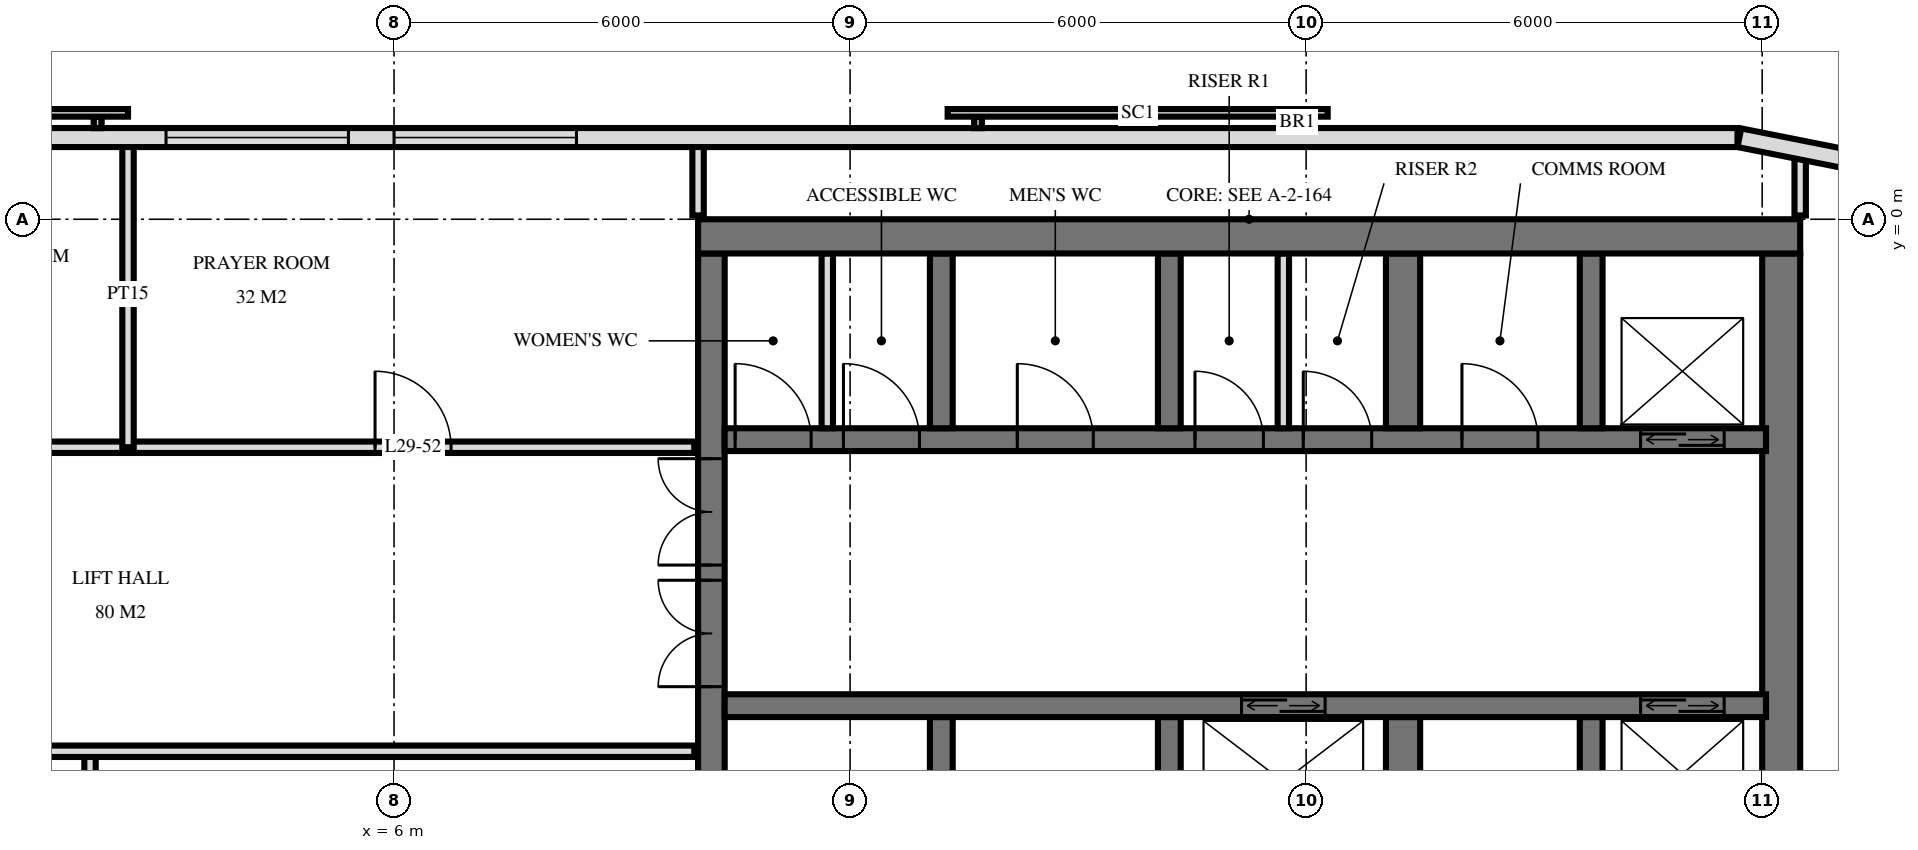
"""IFC4 building model, lengths in metres.
Left out: names, types, materials, properties, quantities, classifications, styles, units other than length and angle.
Written with IfcOpenShell. Run it as: python <this file> out.ifc"""

import sys

from ifc_helpers import new_model, si_unit, direction, frame, frame_2d, origin, place, context, subcontext, project, spatial, rectangle, extrude, element, fill, save


model = new_model("IFC4")
c1 = context("Model", 3, precision=1e-05, world=origin(), true_north=direction((0.0, 1.0)))
c2 = subcontext(c1, "Body", "Model", "MODEL_VIEW")
j1 = project(units=[si_unit("LENGTHUNIT", "METRE"), si_unit("PLANEANGLEUNIT", "RADIAN")], contexts=[c1])
p1 = place(None, origin())
s1 = spatial("IfcSite", under=j1, at=p1, CompositionType="ELEMENT")
p2 = place(p1, origin())
s2 = spatial("IfcBuilding", under=s1, at=p2, CompositionType="ELEMENT")
p3 = place(p2, frame((0.0, 0.0, 116.4)))
s3 = spatial("IfcBuildingStorey", under=s2, at=p3, CompositionType="ELEMENT", Elevation=116.4)
p4 = place(p3, frame((10.0, -0.225, 0.0), z_axis=(0.0, 0.0, 1.0), x_axis=(1.0, 0.0, 0.0)))
e1 = element("IfcWall", 1, at=p4, inside=s3, PredefinedType="SHEAR", context=c2, shape_type="SweptSolid", body=[
    extrude(rectangle(XDim=14.5, YDim=0.45, at=frame_2d((7.25, 0.0))), origin(), (0.0, 0.0, 1.0), 3.6),
])
p5 = place(p3, frame((10.175, -14.55, 0.0), z_axis=(0.0, 0.0, 1.0), x_axis=(0.0, 1.0, 0.0)))
e2 = element("IfcWall", 2, at=p5, inside=s3, PredefinedType="SHEAR", context=c2, shape_type="SweptSolid", body=[
    extrude(rectangle(XDim=14.1, YDim=0.35, at=frame_2d((7.05, 0.0))), origin(), (0.0, 0.0, 1.0), 3.6),
])
p6 = place(p5, frame((8.4, 0.0, 0.0)))
e3 = element("IfcOpeningElement", 3, at=p6, cuts=e2, PredefinedType="OPENING", context=c2, shape_type="SweptSolid", body=[
    extrude(rectangle(XDim=1.4, YDim=2.4, at=frame_2d((0.7, 1.2))), frame((0.0, 0.185, 0.0), z_axis=(0.0, -1.0, 0.0), x_axis=(1.0, 0.0, 0.0)), (0.0, 0.0, 1.0), 0.37),
])
p7 = place(p5, frame((10.0, 0.0, 0.0)))
e4 = element("IfcOpeningElement", 4, at=p7, cuts=e2, PredefinedType="OPENING", context=c2, shape_type="SweptSolid", body=[
    extrude(rectangle(XDim=1.4, YDim=2.4, at=frame_2d((0.7, 1.2))), frame((0.0, 0.185, 0.0), z_axis=(0.0, -1.0, 0.0), x_axis=(1.0, 0.0, 0.0)), (0.0, 0.0, 1.0), 0.37),
])
p8 = place(p5, frame((4.0, 0.0, 0.0)))
e5 = element("IfcOpeningElement", 5, at=p8, cuts=e2, PredefinedType="OPENING", context=c2, shape_type="SweptSolid", body=[
    extrude(rectangle(XDim=1.2, YDim=2.1, at=frame_2d((0.6, 1.05))), frame((0.0, 0.185, 0.0), z_axis=(0.0, -1.0, 0.0), x_axis=(1.0, 0.0, 0.0)), (0.0, 0.0, 1.0), 0.37),
])
p9 = place(p3, frame((24.25, -14.55, 0.0), z_axis=(0.0, 0.0, 1.0), x_axis=(0.0, 1.0, 0.0)))
e6 = element("IfcWall", 6, at=p9, inside=s3, PredefinedType="SHEAR", context=c2, shape_type="SweptSolid", body=[
    extrude(rectangle(XDim=14.1, YDim=0.5, at=frame_2d((7.05, 0.0))), origin(), (0.0, 0.0, 1.0), 3.6),
])
p10 = place(p3, frame((10.35, -2.9, 0.0), z_axis=(0.0, 0.0, 1.0), x_axis=(1.0, 0.0, 0.0)))
e7 = element("IfcWall", 7, at=p10, inside=s3, PredefinedType="SHEAR", context=c2, shape_type="SweptSolid", body=[
    extrude(rectangle(XDim=13.7, YDim=0.3, at=frame_2d((6.85, 0.0))), origin(), (0.0, 0.0, 1.0), 3.6),
])
p11 = place(p10, frame((12.05, 0.0, 0.0)))
e8 = element("IfcOpeningElement", 8, at=p11, cuts=e7, PredefinedType="OPENING", context=c2, shape_type="SweptSolid", body=[
    extrude(rectangle(XDim=1.1, YDim=2.1, at=frame_2d((0.55, 1.05))), frame((0.0, 0.16, 0.0), z_axis=(0.0, -1.0, 0.0), x_axis=(1.0, 0.0, 0.0)), (0.0, 0.0, 1.0), 0.32),
])
p12 = place(p10, frame((6.188, 0.0, 0.0)))
e9 = element("IfcOpeningElement", 9, at=p12, cuts=e7, PredefinedType="OPENING", context=c2, shape_type="SweptSolid", body=[
    extrude(rectangle(XDim=0.9, YDim=2.1, at=frame_2d((0.45, 1.05))), frame((0.0, 0.16, 0.0), z_axis=(0.0, -1.0, 0.0), x_axis=(1.0, 0.0, 0.0)), (0.0, 0.0, 1.0), 0.32),
])
p13 = place(p10, frame((7.613, 0.0, 0.0)))
e10 = element("IfcOpeningElement", 10, at=p13, cuts=e7, PredefinedType="OPENING", context=c2, shape_type="SweptSolid", body=[
    extrude(rectangle(XDim=0.9, YDim=2.1, at=frame_2d((0.45, 1.05))), frame((0.0, 0.16, 0.0), z_axis=(0.0, -1.0, 0.0), x_axis=(1.0, 0.0, 0.0)), (0.0, 0.0, 1.0), 0.32),
])
p14 = place(p10, frame((0.137, 0.0, 0.0)))
e11 = element("IfcOpeningElement", 11, at=p14, cuts=e7, PredefinedType="OPENING", context=c2, shape_type="SweptSolid", body=[
    extrude(rectangle(XDim=1.0, YDim=2.1, at=frame_2d((0.5, 1.05))), frame((0.0, 0.16, 0.0), z_axis=(0.0, -1.0, 0.0), x_axis=(1.0, 0.0, 0.0)), (0.0, 0.0, 1.0), 0.32),
])
p15 = place(p10, frame((1.562, 0.0, 0.0)))
e12 = element("IfcOpeningElement", 12, at=p15, cuts=e7, PredefinedType="OPENING", context=c2, shape_type="SweptSolid", body=[
    extrude(rectangle(XDim=1.0, YDim=2.1, at=frame_2d((0.5, 1.05))), frame((0.0, 0.16, 0.0), z_axis=(0.0, -1.0, 0.0), x_axis=(1.0, 0.0, 0.0)), (0.0, 0.0, 1.0), 0.32),
])
p16 = place(p10, frame((3.85, 0.0, 0.0)))
e13 = element("IfcOpeningElement", 13, at=p16, cuts=e7, PredefinedType="OPENING", context=c2, shape_type="SweptSolid", body=[
    extrude(rectangle(XDim=1.0, YDim=2.1, at=frame_2d((0.5, 1.05))), frame((0.0, 0.16, 0.0), z_axis=(0.0, -1.0, 0.0), x_axis=(1.0, 0.0, 0.0)), (0.0, 0.0, 1.0), 0.32),
])
p17 = place(p10, frame((9.7, 0.0, 0.0)))
e14 = element("IfcOpeningElement", 14, at=p17, cuts=e7, PredefinedType="OPENING", context=c2, shape_type="SweptSolid", body=[
    extrude(rectangle(XDim=1.0, YDim=2.1, at=frame_2d((0.5, 1.05))), frame((0.0, 0.16, 0.0), z_axis=(0.0, -1.0, 0.0), x_axis=(1.0, 0.0, 0.0)), (0.0, 0.0, 1.0), 0.32),
])
p18 = place(p3, frame((10.35, -6.4, 0.0), z_axis=(0.0, 0.0, 1.0), x_axis=(1.0, 0.0, 0.0)))
e15 = element("IfcWall", 15, at=p18, inside=s3, PredefinedType="SHEAR", context=c2, shape_type="SweptSolid", body=[
    extrude(rectangle(XDim=13.7, YDim=0.3, at=frame_2d((6.85, 0.0))), origin(), (0.0, 0.0, 1.0), 3.6),
])
p19 = place(p18, frame((12.05, 0.0, 0.0)))
e16 = element("IfcOpeningElement", 16, at=p19, cuts=e15, PredefinedType="OPENING", context=c2, shape_type="SweptSolid", body=[
    extrude(rectangle(XDim=1.1, YDim=2.1, at=frame_2d((0.55, 1.05))), frame((0.0, 0.16, 0.0), z_axis=(0.0, -1.0, 0.0), x_axis=(1.0, 0.0, 0.0)), (0.0, 0.0, 1.0), 0.32),
])
p20 = place(p18, frame((6.8, 0.0, 0.0)))
e17 = element("IfcOpeningElement", 17, at=p20, cuts=e15, PredefinedType="OPENING", context=c2, shape_type="SweptSolid", body=[
    extrude(rectangle(XDim=1.1, YDim=2.1, at=frame_2d((0.55, 1.05))), frame((0.0, 0.16, 0.0), z_axis=(0.0, -1.0, 0.0), x_axis=(1.0, 0.0, 0.0)), (0.0, 0.0, 1.0), 0.32),
])
for number, where, z_axis, x_axis in (
    (18, (13.2, -2.75, 0.0), (0.0, 0.0, 1.0), (0.0, 1.0, 0.0)),
    (19, (13.2, -8.85, 0.0), (0.0, 0.0, 1.0), (0.0, 1.0, 0.0)),
    (20, (16.2, -2.75, 0.0), (0.0, 0.0, 1.0), (0.0, 1.0, 0.0)),
    (21, (16.2, -8.85, 0.0), (0.0, 0.0, 1.0), (0.0, 1.0, 0.0)),
):
    element("IfcWall", number, at=place(p3, frame(where, z_axis=z_axis, x_axis=x_axis)), inside=s3, PredefinedType="SHEAR", context=c2, shape_type="SweptSolid", body=[
        extrude(rectangle(XDim=2.3, YDim=0.3, at=frame_2d((1.15, 0.0))), origin(), (0.0, 0.0, 1.0), 3.6),
    ])
for number, where, z_axis, x_axis in (
    (22, (19.275, -2.75, 0.0), (0.0, 0.0, 1.0), (0.0, 1.0, 0.0)),
    (23, (19.275, -8.85, 0.0), (0.0, 0.0, 1.0), (0.0, 1.0, 0.0)),
):
    element("IfcWall", number, at=place(p3, frame(where, z_axis=z_axis, x_axis=x_axis)), inside=s3, PredefinedType="SHEAR", context=c2, shape_type="SweptSolid", body=[
        extrude(rectangle(XDim=2.3, YDim=0.45, at=frame_2d((1.15, 0.0))), origin(), (0.0, 0.0, 1.0), 3.6),
    ])
for number, where, z_axis, x_axis in (
    (24, (21.75, -2.75, 0.0), (0.0, 0.0, 1.0), (0.0, 1.0, 0.0)),
    (25, (21.75, -8.85, 0.0), (0.0, 0.0, 1.0), (0.0, 1.0, 0.0)),
):
    element("IfcWall", number, at=place(p3, frame(where, z_axis=z_axis, x_axis=x_axis)), inside=s3, PredefinedType="SHEAR", context=c2, shape_type="SweptSolid", body=[
        extrude(rectangle(XDim=2.3, YDim=0.3, at=frame_2d((1.15, 0.0))), origin(), (0.0, 0.0, 1.0), 3.6),
    ])
p21 = place(p3, frame((25.349, 0.745, 0.0), z_axis=(0.0, 0.0, 1.0), x_axis=(-0.980803419081, 0.194999110559, 0.0)))
e26 = element("IfcWall", 26, at=p21, inside=s3, PredefinedType="SOLIDWALL", context=c2, shape_type="SweptSolid", body=[
    extrude(rectangle(XDim=1.681, YDim=0.25, at=frame_2d((0.841, 0.0))), origin(), (0.0, 0.0, 1.0), 3.32),
])
p22 = place(p3, frame((23.675, 1.075, 0.0), z_axis=(0.0, 0.0, 1.0), x_axis=(-1.0, 0.0, 0.0)))
e27 = element("IfcWall", 27, at=p22, inside=s3, PredefinedType="SOLIDWALL", context=c2, shape_type="SweptSolid", body=[
    extrude(rectangle(XDim=47.351, YDim=0.25, at=frame_2d((23.675, 0.0))), origin(), (0.0, 0.0, 1.0), 3.32),
])
p23 = place(p22, frame((15.275, 0.0, 0.3)))
e28 = element("IfcOpeningElement", 28, at=p23, cuts=e27, PredefinedType="OPENING", context=c2, shape_type="SweptSolid", body=[
    extrude(rectangle(XDim=2.4, YDim=2.1, at=frame_2d((1.2, 1.05))), frame((0.0, 0.135, 0.0), z_axis=(0.0, -1.0, 0.0), x_axis=(1.0, 0.0, 0.0)), (0.0, 0.0, 1.0), 0.27),
])
p24 = place(p22, frame((18.275, 0.0, 0.3)))
e29 = element("IfcOpeningElement", 29, at=p24, cuts=e27, PredefinedType="OPENING", context=c2, shape_type="SweptSolid", body=[
    extrude(rectangle(XDim=2.4, YDim=2.1, at=frame_2d((1.2, 1.05))), frame((0.0, 0.135, 0.0), z_axis=(0.0, -1.0, 0.0), x_axis=(1.0, 0.0, 0.0)), (0.0, 0.0, 1.0), 0.27),
])
p25 = place(p22, frame((24.275, 0.0, 0.3)))
e30 = element("IfcOpeningElement", 30, at=p25, cuts=e27, PredefinedType="OPENING", context=c2, shape_type="SweptSolid", body=[
    extrude(rectangle(XDim=2.4, YDim=2.1, at=frame_2d((1.2, 1.05))), frame((0.0, 0.135, 0.0), z_axis=(0.0, -1.0, 0.0), x_axis=(1.0, 0.0, 0.0)), (0.0, 0.0, 1.0), 0.27),
])
for number, where, z_axis, x_axis in (
    (31, (17.7, -2.75, 0.0), (0.0, 0.0, 1.0), (0.0, 1.0, 0.0)),
    (32, (11.7, -2.75, 0.0), (0.0, 0.0, 1.0), (0.0, 1.0, 0.0)),
):
    element("IfcWall", number, at=place(p3, frame(where, z_axis=z_axis, x_axis=x_axis)), inside=s3, PredefinedType="PARTITIONING", context=c2, shape_type="SweptSolid", body=[
        extrude(rectangle(XDim=2.3, YDim=0.15, at=frame_2d((1.15, 0.0))), origin(), (0.0, 0.0, 1.0), 3.3),
    ])
p26 = place(p3, frame((24.5, 0.05, 0.0), z_axis=(0.0, 0.0, 1.0), x_axis=(0.0, 1.0, 0.0)))
e33 = element("IfcWall", 33, at=p26, inside=s3, PredefinedType="PARTITIONING", context=c2, shape_type="SweptSolid", body=[
    extrude(rectangle(XDim=0.807, YDim=0.15, at=frame_2d((0.404, 0.0))), origin(), (0.0, 0.0, 1.0), 3.32),
])
p27 = place(p3, frame((10.0, 0.05, 0.0), z_axis=(0.0, 0.0, 1.0), x_axis=(0.0, 1.0, 0.0)))
e34 = element("IfcWall", 34, at=p27, inside=s3, PredefinedType="PARTITIONING", context=c2, shape_type="SweptSolid", body=[
    extrude(rectangle(XDim=0.97, YDim=0.15, at=frame_2d((0.485, 0.0))), origin(), (0.0, 0.0, 1.0), 3.32),
])
p28 = place(p3, frame((2.5, -3.0, 0.0), z_axis=(0.0, 0.0, 1.0), x_axis=(0.0, 1.0, 0.0)))
e35 = element("IfcWall", 35, at=p28, inside=s3, PredefinedType="PARTITIONING", context=c2, shape_type="SweptSolid", body=[
    extrude(rectangle(XDim=4.02, YDim=0.15, at=frame_2d((2.01, 0.0))), origin(), (0.0, 0.0, 1.0), 3.32),
])
p29 = place(p3, frame((2.0, -11.0, 0.0), z_axis=(0.0, 0.0, 1.0), x_axis=(0.0, 1.0, 0.0)))
e36 = element("IfcWall", 36, at=p29, inside=s3, PredefinedType="PARTITIONING", context=c2, shape_type="SweptSolid", body=[
    extrude(rectangle(XDim=4.0, YDim=0.15, at=frame_2d((2.0, 0.0))), origin(), (0.0, 0.0, 1.0), 3.32),
])
p30 = place(p3, frame((-9.95, -7.0, 0.0), z_axis=(0.0, 0.0, 1.0), x_axis=(1.0, 0.0, 0.0)))
e37 = element("IfcWall", 37, at=p30, inside=s3, PredefinedType="PARTITIONING", context=c2, shape_type="SweptSolid", body=[
    extrude(rectangle(XDim=19.9, YDim=0.15, at=frame_2d((9.95, 0.0))), origin(), (0.0, 0.0, 1.0), 3.32),
])
p31 = place(p30, frame((9.45, 0.0, 0.0)))
e38 = element("IfcOpeningElement", 38, at=p31, cuts=e37, PredefinedType="OPENING", context=c2, shape_type="SweptSolid", body=[
    extrude(rectangle(XDim=1.0, YDim=2.1, at=frame_2d((0.5, 1.05))), frame((0.0, 0.085, 0.0), z_axis=(0.0, -1.0, 0.0), x_axis=(1.0, 0.0, 0.0)), (0.0, 0.0, 1.0), 0.17),
])
p32 = place(p30, frame((3.45, 0.0, 0.0)))
e39 = element("IfcOpeningElement", 39, at=p32, cuts=e37, PredefinedType="OPENING", context=c2, shape_type="SweptSolid", body=[
    extrude(rectangle(XDim=1.0, YDim=2.1, at=frame_2d((0.5, 1.05))), frame((0.0, 0.085, 0.0), z_axis=(0.0, -1.0, 0.0), x_axis=(1.0, 0.0, 0.0)), (0.0, 0.0, 1.0), 0.17),
])
p33 = place(p3, frame((-9.95, -3.0, 0.0), z_axis=(0.0, 0.0, 1.0), x_axis=(1.0, 0.0, 0.0)))
e40 = element("IfcWall", 40, at=p33, inside=s3, PredefinedType="PARTITIONING", context=c2, shape_type="SweptSolid", body=[
    extrude(rectangle(XDim=19.9, YDim=0.15, at=frame_2d((9.95, 0.0))), origin(), (0.0, 0.0, 1.0), 3.32),
])
p34 = place(p33, frame((0.95, 0.0, 0.0)))
e41 = element("IfcOpeningElement", 41, at=p34, cuts=e40, PredefinedType="OPENING", context=c2, shape_type="SweptSolid", body=[
    extrude(rectangle(XDim=1.0, YDim=2.1, at=frame_2d((0.5, 1.05))), frame((0.0, 0.085, 0.0), z_axis=(0.0, -1.0, 0.0), x_axis=(1.0, 0.0, 0.0)), (0.0, 0.0, 1.0), 0.17),
])
p35 = place(p33, frame((3.7, 0.0, 0.0)))
e42 = element("IfcOpeningElement", 42, at=p35, cuts=e40, PredefinedType="OPENING", context=c2, shape_type="SweptSolid", body=[
    extrude(rectangle(XDim=1.0, YDim=2.1, at=frame_2d((0.5, 1.05))), frame((0.0, 0.085, 0.0), z_axis=(0.0, -1.0, 0.0), x_axis=(1.0, 0.0, 0.0)), (0.0, 0.0, 1.0), 0.17),
])
p36 = place(p33, frame((8.45, 0.0, 0.0)))
e43 = element("IfcOpeningElement", 43, at=p36, cuts=e40, PredefinedType="OPENING", context=c2, shape_type="SweptSolid", body=[
    extrude(rectangle(XDim=1.0, YDim=2.1, at=frame_2d((0.5, 1.05))), frame((0.0, 0.085, 0.0), z_axis=(0.0, -1.0, 0.0), x_axis=(1.0, 0.0, 0.0)), (0.0, 0.0, 1.0), 0.17),
])
p37 = place(p33, frame((15.7, 0.0, 0.0)))
e44 = element("IfcOpeningElement", 44, at=p37, cuts=e40, PredefinedType="OPENING", context=c2, shape_type="SweptSolid", body=[
    extrude(rectangle(XDim=1.0, YDim=2.1, at=frame_2d((0.5, 1.05))), frame((0.0, 0.085, 0.0), z_axis=(0.0, -1.0, 0.0), x_axis=(1.0, 0.0, 0.0)), (0.0, 0.0, 1.0), 0.17),
])
p38 = place(p23, origin())
e45 = element("IfcWindow", 45, at=p38, inside=s3, PartitioningType="SINGLE_PANEL", PredefinedType="WINDOW", context=c2, shape_type="SweptSolid", body=[
    extrude(rectangle(XDim=2.4, YDim=2.1, at=frame_2d((1.2, 1.05))), frame((0.0, 0.03, 0.0), z_axis=(0.0, -1.0, 0.0), x_axis=(1.0, 0.0, 0.0)), (0.0, 0.0, 1.0), 0.06),
])
fill(e28, e45)
p39 = place(p24, origin())
e46 = element("IfcWindow", 46, at=p39, inside=s3, PartitioningType="SINGLE_PANEL", PredefinedType="WINDOW", context=c2, shape_type="SweptSolid", body=[
    extrude(rectangle(XDim=2.4, YDim=2.1, at=frame_2d((1.2, 1.05))), frame((0.0, 0.03, 0.0), z_axis=(0.0, -1.0, 0.0), x_axis=(1.0, 0.0, 0.0)), (0.0, 0.0, 1.0), 0.06),
])
fill(e29, e46)
p40 = place(p11, origin())
e47 = element("IfcDoor", 47, at=p40, inside=s3, OperationType="DOUBLE_DOOR_SLIDING", PredefinedType="USERDEFINED", context=c2, shape_type="SweptSolid", body=[
    extrude(rectangle(XDim=1.1, YDim=2.1, at=frame_2d((0.55, 1.05))), frame((0.0, 0.025, 0.0), z_axis=(0.0, -1.0, 0.0), x_axis=(1.0, 0.0, 0.0)), (0.0, 0.0, 1.0), 0.05),
])
fill(e8, e47)
p41 = place(p19, origin())
e48 = element("IfcDoor", 48, at=p41, inside=s3, OperationType="DOUBLE_DOOR_SLIDING", PredefinedType="USERDEFINED", context=c2, shape_type="SweptSolid", body=[
    extrude(rectangle(XDim=1.1, YDim=2.1, at=frame_2d((0.55, 1.05))), frame((0.0, 0.025, 0.0), z_axis=(0.0, -1.0, 0.0), x_axis=(1.0, 0.0, 0.0)), (0.0, 0.0, 1.0), 0.05),
])
fill(e16, e48)
p42 = place(p20, origin())
e49 = element("IfcDoor", 49, at=p42, inside=s3, OperationType="DOUBLE_DOOR_SLIDING", PredefinedType="USERDEFINED", context=c2, shape_type="SweptSolid", body=[
    extrude(rectangle(XDim=1.1, YDim=2.1, at=frame_2d((0.55, 1.05))), frame((0.0, 0.025, 0.0), z_axis=(0.0, -1.0, 0.0), x_axis=(1.0, 0.0, 0.0)), (0.0, 0.0, 1.0), 0.05),
])
fill(e17, e49)
p43 = place(p6, origin())
e50 = element("IfcDoor", 50, at=p43, inside=s3, OperationType="DOUBLE_DOOR_SINGLE_SWING", PredefinedType="DOOR", context=c2, shape_type="SweptSolid", body=[
    extrude(rectangle(XDim=1.4, YDim=2.4, at=frame_2d((0.7, 1.2))), frame((0.0, 0.025, 0.0), z_axis=(0.0, -1.0, 0.0), x_axis=(1.0, 0.0, 0.0)), (0.0, 0.0, 1.0), 0.05),
])
fill(e3, e50)
p44 = place(p7, origin())
e51 = element("IfcDoor", 51, at=p44, inside=s3, OperationType="DOUBLE_DOOR_SINGLE_SWING", PredefinedType="DOOR", context=c2, shape_type="SweptSolid", body=[
    extrude(rectangle(XDim=1.4, YDim=2.4, at=frame_2d((0.7, 1.2))), frame((0.0, 0.025, 0.0), z_axis=(0.0, -1.0, 0.0), x_axis=(1.0, 0.0, 0.0)), (0.0, 0.0, 1.0), 0.05),
])
fill(e4, e51)
p45 = place(p12, origin())
e52 = element("IfcDoor", 52, at=p45, inside=s3, OperationType="SINGLE_SWING_RIGHT", PredefinedType="DOOR", context=c2, shape_type="SweptSolid", body=[
    extrude(rectangle(XDim=0.9, YDim=2.1, at=frame_2d((0.45, 1.05))), frame((0.0, 0.025, 0.0), z_axis=(0.0, -1.0, 0.0), x_axis=(1.0, 0.0, 0.0)), (0.0, 0.0, 1.0), 0.05),
])
fill(e9, e52)
p46 = place(p13, origin())
e53 = element("IfcDoor", 53, at=p46, inside=s3, OperationType="SINGLE_SWING_RIGHT", PredefinedType="DOOR", context=c2, shape_type="SweptSolid", body=[
    extrude(rectangle(XDim=0.9, YDim=2.1, at=frame_2d((0.45, 1.05))), frame((0.0, 0.025, 0.0), z_axis=(0.0, -1.0, 0.0), x_axis=(1.0, 0.0, 0.0)), (0.0, 0.0, 1.0), 0.05),
])
fill(e10, e53)
p47 = place(p14, origin())
e54 = element("IfcDoor", 54, at=p47, inside=s3, OperationType="SINGLE_SWING_RIGHT", PredefinedType="DOOR", context=c2, shape_type="SweptSolid", body=[
    extrude(rectangle(XDim=1.0, YDim=2.1, at=frame_2d((0.5, 1.05))), frame((0.0, 0.025, 0.0), z_axis=(0.0, -1.0, 0.0), x_axis=(1.0, 0.0, 0.0)), (0.0, 0.0, 1.0), 0.05),
])
fill(e11, e54)
p48 = place(p15, origin())
e55 = element("IfcDoor", 55, at=p48, inside=s3, OperationType="SINGLE_SWING_RIGHT", PredefinedType="DOOR", context=c2, shape_type="SweptSolid", body=[
    extrude(rectangle(XDim=1.0, YDim=2.1, at=frame_2d((0.5, 1.05))), frame((0.0, 0.025, 0.0), z_axis=(0.0, -1.0, 0.0), x_axis=(1.0, 0.0, 0.0)), (0.0, 0.0, 1.0), 0.05),
])
fill(e12, e55)
p49 = place(p16, origin())
e56 = element("IfcDoor", 56, at=p49, inside=s3, OperationType="SINGLE_SWING_RIGHT", PredefinedType="DOOR", context=c2, shape_type="SweptSolid", body=[
    extrude(rectangle(XDim=1.0, YDim=2.1, at=frame_2d((0.5, 1.05))), frame((0.0, 0.025, 0.0), z_axis=(0.0, -1.0, 0.0), x_axis=(1.0, 0.0, 0.0)), (0.0, 0.0, 1.0), 0.05),
])
fill(e13, e56)
p50 = place(p17, origin())
e57 = element("IfcDoor", 57, at=p50, inside=s3, OperationType="SINGLE_SWING_RIGHT", PredefinedType="DOOR", context=c2, shape_type="SweptSolid", body=[
    extrude(rectangle(XDim=1.0, YDim=2.1, at=frame_2d((0.5, 1.05))), frame((0.0, 0.025, 0.0), z_axis=(0.0, -1.0, 0.0), x_axis=(1.0, 0.0, 0.0)), (0.0, 0.0, 1.0), 0.05),
])
fill(e14, e57)
p51 = place(p37, origin())
e58 = element("IfcDoor", 58, at=p51, inside=s3, OperationType="SINGLE_SWING_RIGHT", PredefinedType="DOOR", context=c2, shape_type="SweptSolid", body=[
    extrude(rectangle(XDim=1.0, YDim=2.1, at=frame_2d((0.5, 1.05))), frame((0.0, 0.025, 0.0), z_axis=(0.0, -1.0, 0.0), x_axis=(1.0, 0.0, 0.0)), (0.0, 0.0, 1.0), 0.05),
])
fill(e44, e58)
save(model, sys.argv[1])
